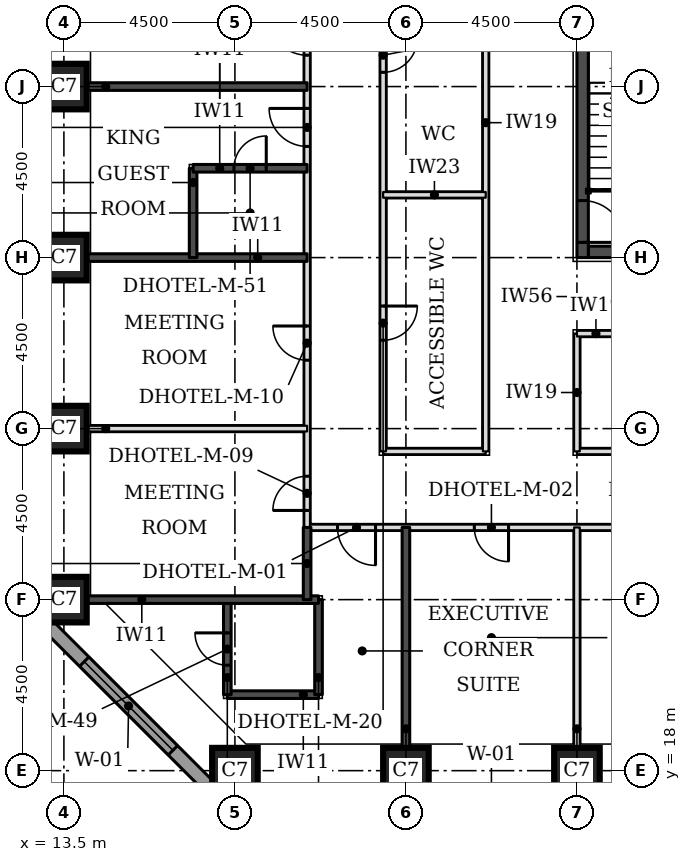
"""IFC4 building model, lengths in metres.
Left out: names, types, materials, properties, quantities, classifications, styles, units other than length and angle.
Written with IfcOpenShell. Run it as: python <this file> out.ifc"""

import sys

from ifc_helpers import new_model, si_unit, direction, frame, frame_2d, origin, origin_2d, place, context, subcontext, project, spatial, rectangle, extrude, element, fill, save


model = new_model("IFC4")
c1 = context("Model", 3, precision=1e-05, world=origin(), true_north=direction((0.0, 1.0)))
c2 = subcontext(c1, "Body", "Model", "MODEL_VIEW")
j1 = project(units=[si_unit("LENGTHUNIT", "METRE"), si_unit("PLANEANGLEUNIT", "RADIAN")], contexts=[c1])
p1 = place(None, origin())
s1 = spatial("IfcSite", under=j1, at=p1, CompositionType="ELEMENT")
p2 = place(p1, origin())
s2 = spatial("IfcBuilding", under=s1, at=p2, CompositionType="ELEMENT")
p3 = place(p2, frame((0.0, 0.0, 23.1)))
s3 = spatial("IfcBuildingStorey", under=s2, at=p3, CompositionType="ELEMENT", Elevation=23.1)
for number, where, z_axis, x_axis in (
    (1, (18.0, 18.0, 0.0), (0.0, 0.0, 1.0), (1.0, 0.0, 0.0)),
    (2, (22.5, 18.0, 0.0), (0.0, 0.0, 1.0), (1.0, 0.0, 0.0)),
    (3, (27.0, 18.0, 0.0), (0.0, 0.0, 1.0), (1.0, 0.0, 0.0)),
    (4, (13.5, 22.5, 0.0), (0.0, 0.0, 1.0), (1.0, 0.0, 0.0)),
    (5, (13.5, 27.0, 0.0), (0.0, 0.0, 1.0), (1.0, 0.0, 0.0)),
    (6, (13.5, 31.5, 0.0), (0.0, 0.0, 1.0), (1.0, 0.0, 0.0)),
    (7, (13.5, 36.0, 0.0), (0.0, 0.0, 1.0), (1.0, 0.0, 0.0)),
):
    element("IfcColumn", number, at=place(p3, frame(where, z_axis=z_axis, x_axis=x_axis)), inside=s3, PredefinedType="COLUMN", context=c2, shape_type="SweptSolid", body=[
        extrude(rectangle(XDim=1.2, YDim=1.2, at=origin_2d()), origin(), (0.0, 0.0, 1.0), 3.3),
    ])
p4 = place(p3, frame((27.3, 31.65, 0.0), z_axis=(0.0, 0.0, 1.0), x_axis=(1.0, 0.0, 0.0)))
e8 = element("IfcWall", 8, at=p4, inside=s3, PredefinedType="SHEAR", context=c2, shape_type="SweptSolid", body=[
    extrude(rectangle(XDim=8.4, YDim=0.3, at=frame_2d((4.2, 0.0))), origin(), (0.0, 0.0, 1.0), 3.3),
])
p5 = place(p4, frame((4.8, 0.0, 0.0)))
e9 = element("IfcOpeningElement", 9, at=p5, cuts=e8, PredefinedType="OPENING", context=c2, shape_type="SweptSolid", body=[
    extrude(rectangle(XDim=1.8, YDim=2.1, at=frame_2d((0.9, 1.05))), frame((0.0, 0.16, 0.0), z_axis=(0.0, -1.0, 0.0), x_axis=(1.0, 0.0, 0.0)), (0.0, 0.0, 1.0), 0.32),
])
p6 = place(p3, frame((27.15, 31.5, 0.0), z_axis=(0.0, 0.0, 1.0), x_axis=(0.0, 1.0, 0.0)))
e10 = element("IfcWall", 10, at=p6, inside=s3, PredefinedType="SHEAR", context=c2, shape_type="SweptSolid", body=[
    extrude(rectangle(XDim=9.0, YDim=0.3, at=frame_2d((4.5, 0.0))), origin(), (0.0, 0.0, 1.0), 3.3),
])
p7 = place(p6, frame((0.4, 0.0, 0.0)))
e11 = element("IfcOpeningElement", 11, at=p7, cuts=e10, PredefinedType="OPENING", context=c2, shape_type="SweptSolid", body=[
    extrude(rectangle(XDim=1.1, YDim=2.1, at=frame_2d((0.55, 1.05))), frame((0.0, 0.16, 0.0), z_axis=(0.0, -1.0, 0.0), x_axis=(1.0, 0.0, 0.0)), (0.0, 0.0, 1.0), 0.32),
])
p8 = place(p3, frame((12.674, 22.23, 0.0), z_axis=(0.0, 0.0, 1.0), x_axis=(0.707106781187, -0.707106781187, 0.0)))
e12 = element("IfcWall", 12, at=p8, inside=s3, PredefinedType="STANDARD", context=c2, shape_type="SweptSolid", body=[
    extrude(rectangle(XDim=7.151, YDim=0.35, at=frame_2d((3.576, 0.0))), origin(), (0.0, 0.0, 1.0), 3.055),
])
p9 = place(p8, frame((1.926, 0.0, 0.8)))
e13 = element("IfcOpeningElement", 13, at=p9, cuts=e12, PredefinedType="OPENING", context=c2, shape_type="SweptSolid", body=[
    extrude(rectangle(XDim=3.3, YDim=1.5, at=frame_2d((1.65, 0.75))), frame((0.0, 0.185, 0.0), z_axis=(0.0, -1.0, 0.0), x_axis=(1.0, 0.0, 0.0)), (0.0, 0.0, 1.0), 0.37),
])
p10 = place(p3, frame((19.9, 24.4, 0.0), z_axis=(0.0, 0.0, 1.0), x_axis=(1.0, 0.0, 0.0)))
e14 = element("IfcWall", 14, at=p10, inside=s3, PredefinedType="PARTITIONING", context=c2, shape_type="SweptSolid", body=[
    extrude(rectangle(XDim=32.2, YDim=0.15, at=frame_2d((16.1, 0.0))), origin(), (0.0, 0.0, 1.0), 3.08),
])
p11 = place(p10, frame((4.4, 0.0, 0.0)))
e15 = element("IfcOpeningElement", 15, at=p11, cuts=e14, PredefinedType="OPENING", context=c2, shape_type="SweptSolid", body=[
    extrude(rectangle(XDim=0.9, YDim=2.1, at=frame_2d((0.45, 1.05))), frame((0.0, 0.085, 0.0), z_axis=(0.0, -1.0, 0.0), x_axis=(1.0, 0.0, 0.0)), (0.0, 0.0, 1.0), 0.17),
])
p12 = place(p10, frame((8.9, 0.0, 0.0)))
e16 = element("IfcOpeningElement", 16, at=p12, cuts=e14, PredefinedType="OPENING", context=c2, shape_type="SweptSolid", body=[
    extrude(rectangle(XDim=0.9, YDim=2.1, at=frame_2d((0.45, 1.05))), frame((0.0, 0.085, 0.0), z_axis=(0.0, -1.0, 0.0), x_axis=(1.0, 0.0, 0.0)), (0.0, 0.0, 1.0), 0.17),
])
p13 = place(p10, frame((13.4, 0.0, 0.0)))
e17 = element("IfcOpeningElement", 17, at=p13, cuts=e14, PredefinedType="OPENING", context=c2, shape_type="SweptSolid", body=[
    extrude(rectangle(XDim=0.9, YDim=2.1, at=frame_2d((0.45, 1.05))), frame((0.0, 0.085, 0.0), z_axis=(0.0, -1.0, 0.0), x_axis=(1.0, 0.0, 0.0)), (0.0, 0.0, 1.0), 0.17),
])
p14 = place(p10, frame((17.9, 0.0, 0.0)))
e18 = element("IfcOpeningElement", 18, at=p14, cuts=e14, PredefinedType="OPENING", context=c2, shape_type="SweptSolid", body=[
    extrude(rectangle(XDim=0.9, YDim=2.1, at=frame_2d((0.45, 1.05))), frame((0.0, 0.085, 0.0), z_axis=(0.0, -1.0, 0.0), x_axis=(1.0, 0.0, 0.0)), (0.0, 0.0, 1.0), 0.17),
])
p15 = place(p10, frame((22.4, 0.0, 0.0)))
e19 = element("IfcOpeningElement", 19, at=p15, cuts=e14, PredefinedType="OPENING", context=c2, shape_type="SweptSolid", body=[
    extrude(rectangle(XDim=0.9, YDim=2.1, at=frame_2d((0.45, 1.05))), frame((0.0, 0.085, 0.0), z_axis=(0.0, -1.0, 0.0), x_axis=(1.0, 0.0, 0.0)), (0.0, 0.0, 1.0), 0.17),
])
p16 = place(p10, frame((26.9, 0.0, 0.0)))
e20 = element("IfcOpeningElement", 20, at=p16, cuts=e14, PredefinedType="OPENING", context=c2, shape_type="SweptSolid", body=[
    extrude(rectangle(XDim=0.9, YDim=2.1, at=frame_2d((0.45, 1.05))), frame((0.0, 0.085, 0.0), z_axis=(0.0, -1.0, 0.0), x_axis=(1.0, 0.0, 0.0)), (0.0, 0.0, 1.0), 0.17),
])
p17 = place(p10, frame((0.8, 0.0, 0.0)))
e21 = element("IfcOpeningElement", 21, at=p17, cuts=e14, PredefinedType="OPENING", context=c2, shape_type="SweptSolid", body=[
    extrude(rectangle(XDim=1.0, YDim=2.1, at=frame_2d((0.5, 1.05))), frame((0.0, 0.085, 0.0), z_axis=(0.0, -1.0, 0.0), x_axis=(1.0, 0.0, 0.0)), (0.0, 0.0, 1.0), 0.17),
])
p18 = place(p10, frame((30.4, 0.0, 0.0)))
e22 = element("IfcOpeningElement", 22, at=p18, cuts=e14, PredefinedType="OPENING", context=c2, shape_type="SweptSolid", body=[
    extrude(rectangle(XDim=1.0, YDim=2.1, at=frame_2d((0.5, 1.05))), frame((0.0, 0.085, 0.0), z_axis=(0.0, -1.0, 0.0), x_axis=(1.0, 0.0, 0.0)), (0.0, 0.0, 1.0), 0.17),
])
p19 = place(p3, frame((19.9, 24.4, 0.0), z_axis=(0.0, 0.0, 1.0), x_axis=(0.0, 1.0, 0.0)))
e23 = element("IfcWall", 23, at=p19, inside=s3, PredefinedType="PARTITIONING", context=c2, shape_type="SweptSolid", body=[
    extrude(rectangle(XDim=25.1, YDim=0.15, at=frame_2d((12.55, 0.0))), origin(), (0.0, 0.0, 1.0), 3.08),
])
p20 = place(p19, frame((0.447, 0.0, 0.0)))
e24 = element("IfcOpeningElement", 24, at=p20, cuts=e23, PredefinedType="OPENING", context=c2, shape_type="SweptSolid", body=[
    extrude(rectangle(XDim=0.9, YDim=2.1, at=frame_2d((0.45, 1.05))), frame((0.0, 0.085, 0.0), z_axis=(0.0, -1.0, 0.0), x_axis=(1.0, 0.0, 0.0)), (0.0, 0.0, 1.0), 0.17),
])
p21 = place(p19, frame((4.4, 0.0, 0.0)))
e25 = element("IfcOpeningElement", 25, at=p21, cuts=e23, PredefinedType="OPENING", context=c2, shape_type="SweptSolid", body=[
    extrude(rectangle(XDim=0.9, YDim=2.1, at=frame_2d((0.45, 1.05))), frame((0.0, 0.085, 0.0), z_axis=(0.0, -1.0, 0.0), x_axis=(1.0, 0.0, 0.0)), (0.0, 0.0, 1.0), 0.17),
])
p22 = place(p19, frame((10.025, 0.0, 0.0)))
e26 = element("IfcOpeningElement", 26, at=p22, cuts=e23, PredefinedType="OPENING", context=c2, shape_type="SweptSolid", body=[
    extrude(rectangle(XDim=1.0, YDim=2.1, at=frame_2d((0.5, 1.05))), frame((0.0, 0.085, 0.0), z_axis=(0.0, -1.0, 0.0), x_axis=(1.0, 0.0, 0.0)), (0.0, 0.0, 1.0), 0.17),
])
p23 = place(p19, frame((12.425, 0.0, 0.0)))
e27 = element("IfcOpeningElement", 27, at=p23, cuts=e23, PredefinedType="OPENING", context=c2, shape_type="SweptSolid", body=[
    extrude(rectangle(XDim=1.0, YDim=2.1, at=frame_2d((0.5, 1.05))), frame((0.0, 0.085, 0.0), z_axis=(0.0, -1.0, 0.0), x_axis=(1.0, 0.0, 0.0)), (0.0, 0.0, 1.0), 0.17),
])
p24 = place(p19, frame((19.025, 0.0, 0.0)))
e28 = element("IfcOpeningElement", 28, at=p24, cuts=e23, PredefinedType="OPENING", context=c2, shape_type="SweptSolid", body=[
    extrude(rectangle(XDim=1.0, YDim=2.1, at=frame_2d((0.5, 1.05))), frame((0.0, 0.085, 0.0), z_axis=(0.0, -1.0, 0.0), x_axis=(1.0, 0.0, 0.0)), (0.0, 0.0, 1.0), 0.17),
])
p25 = place(p19, frame((21.425, 0.0, 0.0)))
e29 = element("IfcOpeningElement", 29, at=p25, cuts=e23, PredefinedType="OPENING", context=c2, shape_type="SweptSolid", body=[
    extrude(rectangle(XDim=1.0, YDim=2.1, at=frame_2d((0.5, 1.05))), frame((0.0, 0.085, 0.0), z_axis=(0.0, -1.0, 0.0), x_axis=(1.0, 0.0, 0.0)), (0.0, 0.0, 1.0), 0.17),
])
p26 = place(p3, frame((21.9, 26.4, 0.0), z_axis=(0.0, 0.0, 1.0), x_axis=(1.0, 0.0, 0.0)))
e30 = element("IfcWall", 30, at=p26, inside=s3, PredefinedType="PARTITIONING", context=c2, shape_type="SweptSolid", body=[
    extrude(rectangle(XDim=2.7, YDim=0.15, at=frame_2d((1.35, 0.0))), origin(), (0.0, 0.0, 1.0), 3.08),
])
p27 = place(p3, frame((21.9, 26.4, 0.0), z_axis=(0.0, 0.0, 1.0), x_axis=(0.0, 1.0, 0.0)))
e31 = element("IfcWall", 31, at=p27, inside=s3, PredefinedType="PARTITIONING", context=c2, shape_type="SweptSolid", body=[
    extrude(rectangle(XDim=16.6, YDim=0.15, at=frame_2d((8.3, 0.0))), origin(), (0.0, 0.0, 1.0), 3.08),
])
p28 = place(p27, frame((2.925, 0.0, 0.0)))
e32 = element("IfcOpeningElement", 32, at=p28, cuts=e31, PredefinedType="OPENING", context=c2, shape_type="SweptSolid", body=[
    extrude(rectangle(XDim=0.9, YDim=2.1, at=frame_2d((0.45, 1.05))), frame((0.0, 0.085, 0.0), z_axis=(0.0, -1.0, 0.0), x_axis=(1.0, 0.0, 0.0)), (0.0, 0.0, 1.0), 0.17),
])
p29 = place(p27, frame((9.975, 0.0, 0.0)))
e33 = element("IfcOpeningElement", 33, at=p29, cuts=e31, PredefinedType="OPENING", context=c2, shape_type="SweptSolid", body=[
    extrude(rectangle(XDim=0.9, YDim=2.1, at=frame_2d((0.45, 1.05))), frame((0.0, 0.085, 0.0), z_axis=(0.0, -1.0, 0.0), x_axis=(1.0, 0.0, 0.0)), (0.0, 0.0, 1.0), 0.17),
])
p30 = place(p3, frame((24.6, 26.4, 0.0), z_axis=(0.0, 0.0, 1.0), x_axis=(0.0, 1.0, 0.0)))
e34 = element("IfcWall", 34, at=p30, inside=s3, PredefinedType="PARTITIONING", context=c2, shape_type="SweptSolid", body=[
    extrude(rectangle(XDim=14.1, YDim=0.15, at=frame_2d((7.05, 0.0))), origin(), (0.0, 0.0, 1.0), 3.08),
])
p31 = place(p3, frame((27.0, 26.4, 0.0), z_axis=(0.0, 0.0, 1.0), x_axis=(1.0, 0.0, 0.0)))
e35 = element("IfcWall", 35, at=p31, inside=s3, PredefinedType="PARTITIONING", context=c2, shape_type="SweptSolid", body=[
    extrude(rectangle(XDim=11.5, YDim=0.15, at=frame_2d((5.75, 0.0))), origin(), (0.0, 0.0, 1.0), 3.08),
])
p32 = place(p3, frame((27.0, 26.4, 0.0), z_axis=(0.0, 0.0, 1.0), x_axis=(0.0, 1.0, 0.0)))
e36 = element("IfcWall", 36, at=p32, inside=s3, PredefinedType="PARTITIONING", context=c2, shape_type="SweptSolid", body=[
    extrude(rectangle(XDim=3.1, YDim=0.15, at=frame_2d((1.55, 0.0))), origin(), (0.0, 0.0, 1.0), 3.08),
])
p33 = place(p3, frame((27.0, 29.5, 0.0), z_axis=(0.0, 0.0, 1.0), x_axis=(1.0, 0.0, 0.0)))
e37 = element("IfcWall", 37, at=p33, inside=s3, PredefinedType="PARTITIONING", context=c2, shape_type="SweptSolid", body=[
    extrude(rectangle(XDim=9.0, YDim=0.15, at=frame_2d((4.5, 0.0))), origin(), (0.0, 0.0, 1.0), 3.08),
])
p34 = place(p33, frame((3.6, 0.0, 0.0)))
e38 = element("IfcOpeningElement", 38, at=p34, cuts=e37, PredefinedType="OPENING", context=c2, shape_type="SweptSolid", body=[
    extrude(rectangle(XDim=1.8, YDim=2.1, at=frame_2d((0.9, 1.05))), frame((0.0, 0.085, 0.0), z_axis=(0.0, -1.0, 0.0), x_axis=(1.0, 0.0, 0.0)), (0.0, 0.0, 1.0), 0.17),
])
p35 = place(p3, frame((22.5, 18.6, 0.0), z_axis=(0.0, 0.0, 1.0), x_axis=(0.0, 1.0, 0.0)))
e39 = element("IfcWall", 39, at=p35, inside=s3, PredefinedType="SOLIDWALL", context=c2, shape_type="SweptSolid", body=[
    extrude(rectangle(XDim=5.8, YDim=0.2, at=frame_2d((2.9, 0.0))), origin(), (0.0, 0.0, 1.0), 3.08),
])
p36 = place(p3, frame((17.8, 20.0, 0.0), z_axis=(0.0, 0.0, 1.0), x_axis=(1.0, 0.0, 0.0)))
e40 = element("IfcWall", 40, at=p36, inside=s3, PredefinedType="SOLIDWALL", context=c2, shape_type="SweptSolid", body=[
    extrude(rectangle(XDim=2.4, YDim=0.2, at=frame_2d((1.2, 0.0))), origin(), (0.0, 0.0, 1.0), 3.08),
])
p37 = place(p3, frame((17.8, 20.0, 0.0), z_axis=(0.0, 0.0, 1.0), x_axis=(0.0, 1.0, 0.0)))
e41 = element("IfcWall", 41, at=p37, inside=s3, PredefinedType="SOLIDWALL", context=c2, shape_type="SweptSolid", body=[
    extrude(rectangle(XDim=2.5, YDim=0.2, at=frame_2d((1.25, 0.0))), origin(), (0.0, 0.0, 1.0), 3.08),
])
p38 = place(p37, frame((0.775, 0.0, 0.0)))
e42 = element("IfcOpeningElement", 42, at=p38, cuts=e41, PredefinedType="OPENING", context=c2, shape_type="SweptSolid", body=[
    extrude(rectangle(XDim=0.85, YDim=2.1, at=frame_2d((0.425, 1.05))), frame((0.0, 0.11, 0.0), z_axis=(0.0, -1.0, 0.0), x_axis=(1.0, 0.0, 0.0)), (0.0, 0.0, 1.0), 0.22),
])
p39 = place(p3, frame((20.2, 20.0, 0.0), z_axis=(0.0, 0.0, 1.0), x_axis=(0.0, 1.0, 0.0)))
e43 = element("IfcWall", 43, at=p39, inside=s3, PredefinedType="SOLIDWALL", context=c2, shape_type="SweptSolid", body=[
    extrude(rectangle(XDim=2.5, YDim=0.2, at=frame_2d((1.25, 0.0))), origin(), (0.0, 0.0, 1.0), 3.08),
])
p40 = place(p3, frame((14.1, 22.5, 0.0), z_axis=(0.0, 0.0, 1.0), x_axis=(1.0, 0.0, 0.0)))
e44 = element("IfcWall", 44, at=p40, inside=s3, PredefinedType="SOLIDWALL", context=c2, shape_type="SweptSolid", body=[
    extrude(rectangle(XDim=6.1, YDim=0.2, at=frame_2d((3.05, 0.0))), origin(), (0.0, 0.0, 1.0), 3.08),
])
p41 = place(p3, frame((19.9, 22.5, 0.0), z_axis=(0.0, 0.0, 1.0), x_axis=(0.0, 1.0, 0.0)))
e45 = element("IfcWall", 45, at=p41, inside=s3, PredefinedType="SOLIDWALL", context=c2, shape_type="SweptSolid", body=[
    extrude(rectangle(XDim=1.9, YDim=0.2, at=frame_2d((0.95, 0.0))), origin(), (0.0, 0.0, 1.0), 3.08),
])
p42 = place(p3, frame((14.1, 31.5, 0.0), z_axis=(0.0, 0.0, 1.0), x_axis=(1.0, 0.0, 0.0)))
e46 = element("IfcWall", 46, at=p42, inside=s3, PredefinedType="SOLIDWALL", context=c2, shape_type="SweptSolid", body=[
    extrude(rectangle(XDim=5.8, YDim=0.2, at=frame_2d((2.9, 0.0))), origin(), (0.0, 0.0, 1.0), 3.08),
])
p43 = place(p3, frame((16.9, 31.5, 0.0), z_axis=(0.0, 0.0, 1.0), x_axis=(0.0, 1.0, 0.0)))
e47 = element("IfcWall", 47, at=p43, inside=s3, PredefinedType="SOLIDWALL", context=c2, shape_type="SweptSolid", body=[
    extrude(rectangle(XDim=2.35, YDim=0.2, at=frame_2d((1.175, 0.0))), origin(), (0.0, 0.0, 1.0), 3.08),
])
p44 = place(p3, frame((16.9, 33.85, 0.0), z_axis=(0.0, 0.0, 1.0), x_axis=(1.0, 0.0, 0.0)))
e48 = element("IfcWall", 48, at=p44, inside=s3, PredefinedType="SOLIDWALL", context=c2, shape_type="SweptSolid", body=[
    extrude(rectangle(XDim=3.0, YDim=0.2, at=frame_2d((1.5, 0.0))), origin(), (0.0, 0.0, 1.0), 3.08),
])
p45 = place(p44, frame((1.075, 0.0, 0.0)))
e49 = element("IfcOpeningElement", 49, at=p45, cuts=e48, PredefinedType="OPENING", context=c2, shape_type="SweptSolid", body=[
    extrude(rectangle(XDim=0.85, YDim=2.1, at=frame_2d((0.425, 1.05))), frame((0.0, 0.11, 0.0), z_axis=(0.0, -1.0, 0.0), x_axis=(1.0, 0.0, 0.0)), (0.0, 0.0, 1.0), 0.22),
])
p46 = place(p3, frame((14.1, 36.0, 0.0), z_axis=(0.0, 0.0, 1.0), x_axis=(1.0, 0.0, 0.0)))
e50 = element("IfcWall", 50, at=p46, inside=s3, PredefinedType="SOLIDWALL", context=c2, shape_type="SweptSolid", body=[
    extrude(rectangle(XDim=5.8, YDim=0.2, at=frame_2d((2.9, 0.0))), origin(), (0.0, 0.0, 1.0), 3.08),
])
for number, where, z_axis, x_axis in (
    (51, (27.0, 18.6, 0.0), (0.0, 0.0, 1.0), (0.0, 1.0, 0.0)),
    (52, (14.1, 27.0, 0.0), (0.0, 0.0, 1.0), (1.0, 0.0, 0.0)),
):
    element("IfcWall", number, at=place(p3, frame(where, z_axis=z_axis, x_axis=x_axis)), inside=s3, PredefinedType="PARTITIONING", context=c2, shape_type="SweptSolid", body=[
        extrude(rectangle(XDim=5.8, YDim=0.15, at=frame_2d((2.9, 0.0))), origin(), (0.0, 0.0, 1.0), 3.08),
    ])
p47 = place(p3, frame((21.9, 33.15, 0.0), z_axis=(0.0, 0.0, 1.0), x_axis=(1.0, 0.0, 0.0)))
e53 = element("IfcWall", 53, at=p47, inside=s3, PredefinedType="PARTITIONING", context=c2, shape_type="SweptSolid", body=[
    extrude(rectangle(XDim=2.7, YDim=0.15, at=frame_2d((1.35, 0.0))), origin(), (0.0, 0.0, 1.0), 3.08),
])
p48 = place(p9, origin())
e54 = element("IfcWindow", 54, at=p48, inside=s3, PartitioningType="SINGLE_PANEL", PredefinedType="WINDOW", context=c2, shape_type="SweptSolid", body=[
    extrude(rectangle(XDim=3.3, YDim=1.5, at=frame_2d((1.65, 0.75))), frame((0.0, 0.085, 0.0), z_axis=(0.0, -1.0, 0.0), x_axis=(1.0, 0.0, 0.0)), (0.0, 0.0, 1.0), 0.06),
])
fill(e13, e54)
p49 = place(p11, frame((0.9, 0.0, 0.0), z_axis=(0.0, 0.0, 1.0), x_axis=(-1.0, 0.0, 0.0)))
e55 = element("IfcDoor", 55, at=p49, inside=s3, OperationType="SINGLE_SWING_LEFT", PredefinedType="DOOR", context=c2, shape_type="SweptSolid", body=[
    extrude(rectangle(XDim=0.9, YDim=2.1, at=frame_2d((0.45, 1.05))), frame((0.0, 0.025, 0.0), z_axis=(0.0, -1.0, 0.0), x_axis=(1.0, 0.0, 0.0)), (0.0, 0.0, 1.0), 0.05),
])
fill(e15, e55)
p50 = place(p20, origin())
e56 = element("IfcDoor", 56, at=p50, inside=s3, OperationType="SINGLE_SWING_LEFT", PredefinedType="DOOR", context=c2, shape_type="SweptSolid", body=[
    extrude(rectangle(XDim=0.9, YDim=2.1, at=frame_2d((0.45, 1.05))), frame((0.0, 0.025, 0.0), z_axis=(0.0, -1.0, 0.0), x_axis=(1.0, 0.0, 0.0)), (0.0, 0.0, 1.0), 0.05),
])
fill(e24, e56)
p51 = place(p21, origin())
e57 = element("IfcDoor", 57, at=p51, inside=s3, OperationType="SINGLE_SWING_RIGHT", PredefinedType="DOOR", context=c2, shape_type="SweptSolid", body=[
    extrude(rectangle(XDim=0.9, YDim=2.1, at=frame_2d((0.45, 1.05))), frame((0.0, 0.025, 0.0), z_axis=(0.0, -1.0, 0.0), x_axis=(1.0, 0.0, 0.0)), (0.0, 0.0, 1.0), 0.05),
])
fill(e25, e57)
p52 = place(p22, origin())
e58 = element("IfcDoor", 58, at=p52, inside=s3, OperationType="SINGLE_SWING_RIGHT", PredefinedType="DOOR", context=c2, shape_type="SweptSolid", body=[
    extrude(rectangle(XDim=1.0, YDim=2.1, at=frame_2d((0.5, 1.05))), frame((0.0, 0.025, 0.0), z_axis=(0.0, -1.0, 0.0), x_axis=(1.0, 0.0, 0.0)), (0.0, 0.0, 1.0), 0.05),
])
fill(e26, e58)
p53 = place(p45, origin())
e59 = element("IfcDoor", 59, at=p53, inside=s3, OperationType="SINGLE_SWING_RIGHT", PredefinedType="DOOR", context=c2, shape_type="SweptSolid", body=[
    extrude(rectangle(XDim=0.85, YDim=2.1, at=frame_2d((0.425, 1.05))), frame((0.0, 0.025, 0.0), z_axis=(0.0, -1.0, 0.0), x_axis=(1.0, 0.0, 0.0)), (0.0, 0.0, 1.0), 0.05),
])
fill(e49, e59)
p54 = place(p23, origin())
e60 = element("IfcDoor", 60, at=p54, inside=s3, OperationType="SINGLE_SWING_RIGHT", PredefinedType="DOOR", context=c2, shape_type="SweptSolid", body=[
    extrude(rectangle(XDim=1.0, YDim=2.1, at=frame_2d((0.5, 1.05))), frame((0.0, 0.025, 0.0), z_axis=(0.0, -1.0, 0.0), x_axis=(1.0, 0.0, 0.0)), (0.0, 0.0, 1.0), 0.05),
])
fill(e27, e60)
p55 = place(p17, frame((1.0, 0.0, 0.0), z_axis=(0.0, 0.0, 1.0), x_axis=(-1.0, 0.0, 0.0)))
e61 = element("IfcDoor", 61, at=p55, inside=s3, OperationType="SINGLE_SWING_LEFT", PredefinedType="DOOR", context=c2, shape_type="SweptSolid", body=[
    extrude(rectangle(XDim=1.0, YDim=2.1, at=frame_2d((0.5, 1.05))), frame((0.0, 0.025, 0.0), z_axis=(0.0, -1.0, 0.0), x_axis=(1.0, 0.0, 0.0)), (0.0, 0.0, 1.0), 0.05),
])
fill(e21, e61)
p56 = place(p38, origin())
e62 = element("IfcDoor", 62, at=p56, inside=s3, OperationType="SINGLE_SWING_RIGHT", PredefinedType="DOOR", context=c2, shape_type="SweptSolid", body=[
    extrude(rectangle(XDim=0.85, YDim=2.1, at=frame_2d((0.425, 1.05))), frame((0.0, 0.025, 0.0), z_axis=(0.0, -1.0, 0.0), x_axis=(1.0, 0.0, 0.0)), (0.0, 0.0, 1.0), 0.05),
])
fill(e42, e62)
p57 = place(p28, frame((0.9, 0.0, 0.0), z_axis=(0.0, 0.0, 1.0), x_axis=(-1.0, 0.0, 0.0)))
e63 = element("IfcDoor", 63, at=p57, inside=s3, OperationType="SINGLE_SWING_LEFT", PredefinedType="DOOR", context=c2, shape_type="SweptSolid", body=[
    extrude(rectangle(XDim=0.9, YDim=2.1, at=frame_2d((0.45, 1.05))), frame((0.0, 0.025, 0.0), z_axis=(0.0, -1.0, 0.0), x_axis=(1.0, 0.0, 0.0)), (0.0, 0.0, 1.0), 0.05),
])
fill(e32, e63)
p58 = place(p29, frame((0.9, 0.0, 0.0), z_axis=(0.0, 0.0, 1.0), x_axis=(-1.0, 0.0, 0.0)))
e64 = element("IfcDoor", 64, at=p58, inside=s3, OperationType="SINGLE_SWING_LEFT", PredefinedType="DOOR", context=c2, shape_type="SweptSolid", body=[
    extrude(rectangle(XDim=0.9, YDim=2.1, at=frame_2d((0.45, 1.05))), frame((0.0, 0.025, 0.0), z_axis=(0.0, -1.0, 0.0), x_axis=(1.0, 0.0, 0.0)), (0.0, 0.0, 1.0), 0.05),
])
fill(e33, e64)
p59 = place(p7, frame((1.1, 0.0, 0.0), z_axis=(0.0, 0.0, 1.0), x_axis=(-1.0, 0.0, 0.0)))
e65 = element("IfcDoor", 65, at=p59, inside=s3, OperationType="SINGLE_SWING_RIGHT", PredefinedType="DOOR", context=c2, shape_type="SweptSolid", body=[
    extrude(rectangle(XDim=1.1, YDim=2.1, at=frame_2d((0.55, 1.05))), frame((0.0, 0.025, 0.0), z_axis=(0.0, -1.0, 0.0), x_axis=(1.0, 0.0, 0.0)), (0.0, 0.0, 1.0), 0.05),
])
fill(e11, e65)
save(model, sys.argv[1])
